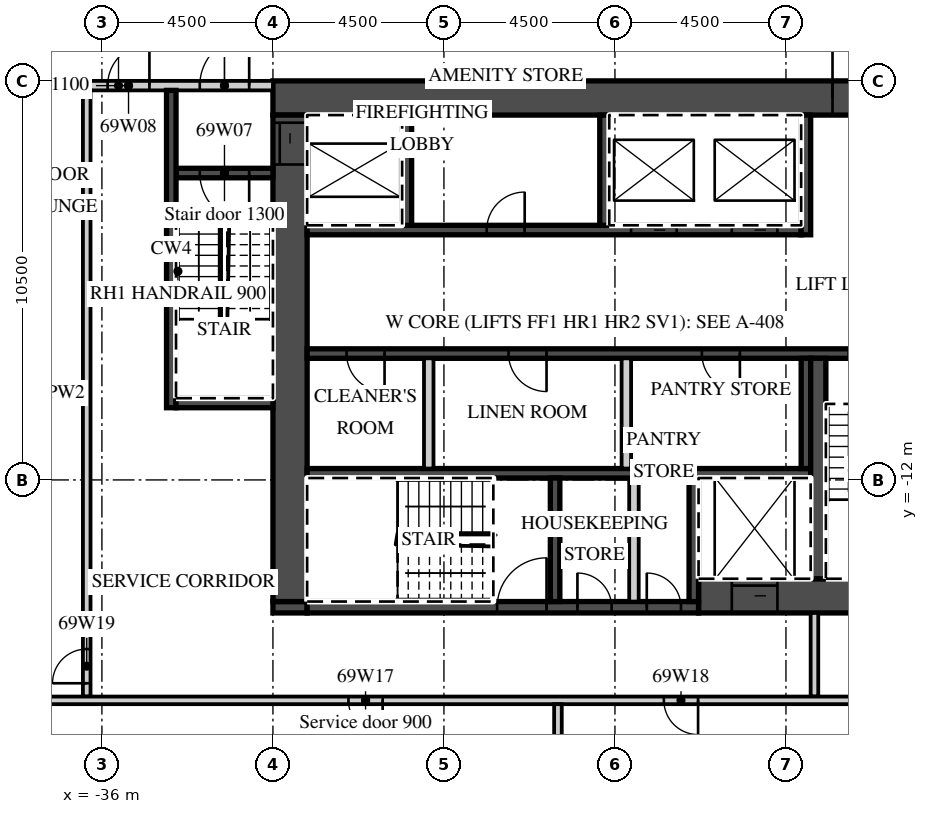
"""IFC4 building model, lengths in metres.
Left out: names, types, materials, properties, quantities, classifications, styles, units other than length and angle.
Written with IfcOpenShell. Run it as: python <this file> out.ifc"""

import sys

from ifc_helpers import new_model, si_unit, direction, frame, frame_2d, origin, place, context, subcontext, project, spatial, rectangle, extrude, element, fill, save


model = new_model("IFC4")
c1 = context("Model", 3, precision=1e-05, world=origin(), true_north=direction((0.0, 1.0)))
c2 = subcontext(c1, "Body", "Model", "MODEL_VIEW")
j1 = project(units=[si_unit("LENGTHUNIT", "METRE"), si_unit("PLANEANGLEUNIT", "RADIAN")], contexts=[c1])
p1 = place(None, origin())
s1 = spatial("IfcSite", under=j1, at=p1, CompositionType="ELEMENT")
p2 = place(p1, origin())
s2 = spatial("IfcBuilding", under=s1, at=p2, CompositionType="ELEMENT")
p3 = place(p2, frame((0.0, 0.0, 278.4)))
s3 = spatial("IfcBuildingStorey", under=s2, at=p3, CompositionType="ELEMENT", Elevation=278.4)
p4 = place(p3, frame((-31.5, -1.95, 0.0), z_axis=(0.0, 0.0, 1.0), x_axis=(1.0, 0.0, 0.0)))
e1 = element("IfcWall", 1, at=p4, inside=s3, PredefinedType="SHEAR", context=c2, shape_type="SweptSolid", body=[
    extrude(rectangle(XDim=18.0, YDim=0.9, at=frame_2d((9.0, 0.0))), origin(), (0.0, 0.0, 1.0), 3.02),
])
p5 = place(p4, frame((14.725, 0.0, 0.0)))
e2 = element("IfcOpeningElement", 2, at=p5, cuts=e1, PredefinedType="OPENING", context=c2, shape_type="SweptSolid", body=[
    extrude(rectangle(XDim=1.8, YDim=2.1, at=frame_2d((0.9, 1.05))), frame((0.0, 0.46, 0.0), z_axis=(0.0, -1.0, 0.0), x_axis=(1.0, 0.0, 0.0)), (0.0, 0.0, 1.0), 0.92),
])
p6 = place(p3, frame((-20.3, -15.05, 0.0), z_axis=(0.0, 0.0, 1.0), x_axis=(1.0, 0.0, 0.0)))
e3 = element("IfcWall", 3, at=p6, inside=s3, PredefinedType="SHEAR", context=c2, shape_type="SweptSolid", body=[
    extrude(rectangle(XDim=6.8, YDim=0.9, at=frame_2d((3.4, 0.0))), origin(), (0.0, 0.0, 1.0), 3.02),
])
p7 = place(p6, frame((0.875, 0.0, 0.0)))
e4 = element("IfcOpeningElement", 4, at=p7, cuts=e3, PredefinedType="OPENING", context=c2, shape_type="SweptSolid", body=[
    extrude(rectangle(XDim=1.2, YDim=2.1, at=frame_2d((0.6, 1.05))), frame((0.0, 0.46, 0.0), z_axis=(0.0, -1.0, 0.0), x_axis=(1.0, 0.0, 0.0)), (0.0, 0.0, 1.0), 0.92),
])
p8 = place(p3, frame((-31.5, -15.35, 0.0), z_axis=(0.0, 0.0, 1.0), x_axis=(1.0, 0.0, 0.0)))
e5 = element("IfcWall", 5, at=p8, inside=s3, PredefinedType="SHEAR", context=c2, shape_type="SweptSolid", body=[
    extrude(rectangle(XDim=0.9, YDim=0.3, at=frame_2d((0.45, 0.0))), origin(), (0.0, 0.0, 1.0), 3.02),
])
p9 = place(p3, frame((-30.6, -15.35, 0.0), z_axis=(0.0, 0.0, 1.0), x_axis=(1.0, 0.0, 0.0)))
e6 = element("IfcWall", 6, at=p9, inside=s3, PredefinedType="SHEAR", context=c2, shape_type="SweptSolid", body=[
    extrude(rectangle(XDim=10.3, YDim=0.3, at=frame_2d((5.15, 0.0))), origin(), (0.0, 0.0, 1.0), 3.02),
])
p10 = place(p9, frame((5.0, 0.0, 0.0)))
e7 = element("IfcOpeningElement", 7, at=p10, cuts=e6, PredefinedType="OPENING", context=c2, shape_type="SweptSolid", body=[
    extrude(rectangle(XDim=1.3, YDim=2.1, at=frame_2d((0.65, 1.05))), frame((0.0, 0.16, 0.0), z_axis=(0.0, -1.0, 0.0), x_axis=(1.0, 0.0, 0.0)), (0.0, 0.0, 1.0), 0.32),
])
p11 = place(p9, frame((7.113, 0.0, 0.0)))
e8 = element("IfcOpeningElement", 8, at=p11, cuts=e6, PredefinedType="OPENING", context=c2, shape_type="SweptSolid", body=[
    extrude(rectangle(XDim=0.9, YDim=2.1, at=frame_2d((0.45, 1.05))), frame((0.0, 0.16, 0.0), z_axis=(0.0, -1.0, 0.0), x_axis=(1.0, 0.0, 0.0)), (0.0, 0.0, 1.0), 0.32),
])
p12 = place(p9, frame((8.938, 0.0, 0.0)))
e9 = element("IfcOpeningElement", 9, at=p12, cuts=e6, PredefinedType="OPENING", context=c2, shape_type="SweptSolid", body=[
    extrude(rectangle(XDim=0.9, YDim=2.1, at=frame_2d((0.45, 1.05))), frame((0.0, 0.16, 0.0), z_axis=(0.0, -1.0, 0.0), x_axis=(1.0, 0.0, 0.0)), (0.0, 0.0, 1.0), 0.32),
])
p13 = place(p3, frame((-31.05, -15.2, 0.0), z_axis=(0.0, 0.0, 1.0), x_axis=(0.0, 1.0, 0.0)))
e10 = element("IfcWall", 10, at=p13, inside=s3, PredefinedType="SHEAR", context=c2, shape_type="SweptSolid", body=[
    extrude(rectangle(XDim=12.8, YDim=0.9, at=frame_2d((6.4, 0.0))), origin(), (0.0, 0.0, 1.0), 3.02),
])
p14 = place(p13, frame((11.5, 0.0, 0.0)))
e11 = element("IfcOpeningElement", 11, at=p14, cuts=e10, PredefinedType="OPENING", context=c2, shape_type="SweptSolid", body=[
    extrude(rectangle(XDim=1.1, YDim=2.1, at=frame_2d((0.55, 1.05))), frame((0.0, 0.46, 0.0), z_axis=(0.0, -1.0, 0.0), x_axis=(1.0, 0.0, 0.0)), (0.0, 0.0, 1.0), 0.92),
])
p15 = place(p3, frame((-30.6, -5.425, 0.0), z_axis=(0.0, 0.0, 1.0), x_axis=(1.0, 0.0, 0.0)))
e12 = element("IfcWall", 12, at=p15, inside=s3, PredefinedType="SHEAR", context=c2, shape_type="SweptSolid", body=[
    extrude(rectangle(XDim=13.0, YDim=0.25, at=frame_2d((6.5, 0.0))), origin(), (0.0, 0.0, 1.0), 3.02),
])
p16 = place(p15, frame((8.525, 0.0, 0.0)))
e13 = element("IfcOpeningElement", 13, at=p16, cuts=e12, PredefinedType="OPENING", context=c2, shape_type="SweptSolid", body=[
    extrude(rectangle(XDim=1.2, YDim=2.1, at=frame_2d((0.6, 1.05))), frame((0.0, 0.135, 0.0), z_axis=(0.0, -1.0, 0.0), x_axis=(1.0, 0.0, 0.0)), (0.0, 0.0, 1.0), 0.27),
])
p17 = place(p15, frame((11.175, 0.0, 0.0)))
e14 = element("IfcOpeningElement", 14, at=p17, cuts=e12, PredefinedType="OPENING", context=c2, shape_type="SweptSolid", body=[
    extrude(rectangle(XDim=1.2, YDim=2.1, at=frame_2d((0.6, 1.05))), frame((0.0, 0.135, 0.0), z_axis=(0.0, -1.0, 0.0), x_axis=(1.0, 0.0, 0.0)), (0.0, 0.0, 1.0), 0.27),
])
p18 = place(p15, frame((4.725, 0.0, 0.0)))
e15 = element("IfcOpeningElement", 15, at=p18, cuts=e12, PredefinedType="OPENING", context=c2, shape_type="SweptSolid", body=[
    extrude(rectangle(XDim=1.0, YDim=2.1, at=frame_2d((0.5, 1.05))), frame((0.0, 0.135, 0.0), z_axis=(0.0, -1.0, 0.0), x_axis=(1.0, 0.0, 0.0)), (0.0, 0.0, 1.0), 0.27),
])
p19 = place(p3, frame((-17.475, -5.55, 0.0), z_axis=(0.0, 0.0, 1.0), x_axis=(0.0, 1.0, 0.0)))
e16 = element("IfcWall", 16, at=p19, inside=s3, PredefinedType="SHEAR", context=c2, shape_type="SweptSolid", body=[
    extrude(rectangle(XDim=3.15, YDim=0.25, at=frame_2d((1.575, 0.0))), origin(), (0.0, 0.0, 1.0), 3.02),
])
for number, where, z_axis, x_axis in (
    (17, (-27.975, -5.3, 0.0), (0.0, 0.0, 1.0), (0.0, 1.0, 0.0)),
    (18, (-22.775, -5.3, 0.0), (0.0, 0.0, 1.0), (0.0, 1.0, 0.0)),
):
    element("IfcWall", number, at=place(p3, frame(where, z_axis=z_axis, x_axis=x_axis)), inside=s3, PredefinedType="SHEAR", context=c2, shape_type="SweptSolid", body=[
        extrude(rectangle(XDim=2.9, YDim=0.25, at=frame_2d((1.45, 0.0))), origin(), (0.0, 0.0, 1.0), 3.02),
    ])
p20 = place(p3, frame((-30.6, -8.675, 0.0), z_axis=(0.0, 0.0, 1.0), x_axis=(1.0, 0.0, 0.0)))
e19 = element("IfcWall", 19, at=p20, inside=s3, PredefinedType="SHEAR", context=c2, shape_type="SweptSolid", body=[
    extrude(rectangle(XDim=16.2, YDim=0.25, at=frame_2d((8.1, 0.0))), origin(), (0.0, 0.0, 1.0), 3.02),
])
p21 = place(p20, frame((14.25, 0.0, 0.0)))
e20 = element("IfcOpeningElement", 20, at=p21, cuts=e19, PredefinedType="OPENING", context=c2, shape_type="SweptSolid", body=[
    extrude(rectangle(XDim=1.3, YDim=2.1, at=frame_2d((0.65, 1.05))), frame((0.0, 0.135, 0.0), z_axis=(0.0, -1.0, 0.0), x_axis=(1.0, 0.0, 0.0)), (0.0, 0.0, 1.0), 0.27),
])
p22 = place(p20, frame((1.038, 0.0, 0.0)))
e21 = element("IfcOpeningElement", 21, at=p22, cuts=e19, PredefinedType="OPENING", context=c2, shape_type="SweptSolid", body=[
    extrude(rectangle(XDim=1.0, YDim=2.1, at=frame_2d((0.5, 1.05))), frame((0.0, 0.135, 0.0), z_axis=(0.0, -1.0, 0.0), x_axis=(1.0, 0.0, 0.0)), (0.0, 0.0, 1.0), 0.27),
])
p23 = place(p20, frame((5.3, 0.0, 0.0)))
e22 = element("IfcOpeningElement", 22, at=p23, cuts=e19, PredefinedType="OPENING", context=c2, shape_type="SweptSolid", body=[
    extrude(rectangle(XDim=1.0, YDim=2.1, at=frame_2d((0.5, 1.05))), frame((0.0, 0.135, 0.0), z_axis=(0.0, -1.0, 0.0), x_axis=(1.0, 0.0, 0.0)), (0.0, 0.0, 1.0), 0.27),
])
p24 = place(p20, frame((10.387, 0.0, 0.0)))
e23 = element("IfcOpeningElement", 23, at=p24, cuts=e19, PredefinedType="OPENING", context=c2, shape_type="SweptSolid", body=[
    extrude(rectangle(XDim=1.0, YDim=2.1, at=frame_2d((0.5, 1.05))), frame((0.0, 0.135, 0.0), z_axis=(0.0, -1.0, 0.0), x_axis=(1.0, 0.0, 0.0)), (0.0, 0.0, 1.0), 0.27),
])
p25 = place(p3, frame((-30.6, -11.825, 0.0), z_axis=(0.0, 0.0, 1.0), x_axis=(1.0, 0.0, 0.0)))
e24 = element("IfcWall", 24, at=p25, inside=s3, PredefinedType="SHEAR", context=c2, shape_type="SweptSolid", body=[
    extrude(rectangle(XDim=13.25, YDim=0.25, at=frame_2d((6.625, 0.0))), origin(), (0.0, 0.0, 1.0), 3.02),
])
p26 = place(p3, frame((-17.475, -11.7, 0.0), z_axis=(0.0, 0.0, 1.0), x_axis=(0.0, 1.0, 0.0)))
e25 = element("IfcWall", 25, at=p26, inside=s3, PredefinedType="SHEAR", context=c2, shape_type="SweptSolid", body=[
    extrude(rectangle(XDim=2.9, YDim=0.25, at=frame_2d((1.45, 0.0))), origin(), (0.0, 0.0, 1.0), 3.02),
])
for number, where, z_axis, x_axis in (
    (26, (-27.4, -11.7, 0.0), (0.0, 0.0, 1.0), (0.0, 1.0, 0.0)),
    (27, (-22.2, -11.7, 0.0), (0.0, 0.0, 1.0), (0.0, 1.0, 0.0)),
):
    element("IfcWall", number, at=place(p3, frame(where, z_axis=z_axis, x_axis=x_axis)), inside=s3, PredefinedType="PARTITIONING", context=c2, shape_type="SweptSolid", body=[
        extrude(rectangle(XDim=2.9, YDim=0.25, at=frame_2d((1.45, 0.0))), origin(), (0.0, 0.0, 1.0), 3.02),
    ])
p27 = place(p3, frame((-17.15, -14.6, 0.0), z_axis=(0.0, 0.0, 1.0), x_axis=(0.0, 1.0, 0.0)))
e28 = element("IfcWall", 28, at=p27, inside=s3, PredefinedType="SHEAR", context=c2, shape_type="SweptSolid", body=[
    extrude(rectangle(XDim=5.8, YDim=0.4, at=frame_2d((2.9, 0.0))), origin(), (0.0, 0.0, 1.0), 3.02),
])
for number, where, z_axis, x_axis in (
    (29, (-20.425, -15.2, 0.0), (0.0, 0.0, 1.0), (0.0, 1.0, 0.0)),
    (30, (-24.075, -15.2, 0.0), (0.0, 0.0, 1.0), (0.0, 1.0, 0.0)),
):
    element("IfcWall", number, at=place(p3, frame(where, z_axis=z_axis, x_axis=x_axis)), inside=s3, PredefinedType="SHEAR", context=c2, shape_type="SweptSolid", body=[
        extrude(rectangle(XDim=3.25, YDim=0.25, at=frame_2d((1.625, 0.0))), origin(), (0.0, 0.0, 1.0), 3.02),
    ])
p28 = place(p3, frame((-22.0, -15.2, 0.0), z_axis=(0.0, 0.0, 1.0), x_axis=(0.0, 1.0, 0.0)))
e31 = element("IfcWall", 31, at=p28, inside=s3, PredefinedType="PARTITIONING", context=c2, shape_type="SweptSolid", body=[
    extrude(rectangle(XDim=3.25, YDim=0.25, at=frame_2d((1.625, 0.0))), origin(), (0.0, 0.0, 1.0), 3.02),
])
p29 = place(p3, frame((-39.627, -1.625, 0.0), z_axis=(0.0, 0.0, 1.0), x_axis=(1.0, 0.0, 0.0)))
e32 = element("IfcWall", 32, at=p29, inside=s3, PredefinedType="PARTITIONING", context=c2, shape_type="SweptSolid", body=[
    extrude(rectangle(XDim=8.127, YDim=0.25, at=frame_2d((4.063, 0.0))), origin(), (0.0, 0.0, 1.0), 3.02),
])
p30 = place(p29, frame((6.202, 0.0, 0.0)))
e33 = element("IfcOpeningElement", 33, at=p30, cuts=e32, PredefinedType="OPENING", context=c2, shape_type="SweptSolid", body=[
    extrude(rectangle(XDim=1.3, YDim=2.1, at=frame_2d((0.65, 1.05))), frame((0.0, 0.135, 0.0), z_axis=(0.0, -1.0, 0.0), x_axis=(1.0, 0.0, 0.0)), (0.0, 0.0, 1.0), 0.27),
])
p31 = place(p29, frame((3.777, 0.0, 0.0)))
e34 = element("IfcOpeningElement", 34, at=p31, cuts=e32, PredefinedType="OPENING", context=c2, shape_type="SweptSolid", body=[
    extrude(rectangle(XDim=1.1, YDim=2.1, at=frame_2d((0.55, 1.05))), frame((0.0, 0.135, 0.0), z_axis=(0.0, -1.0, 0.0), x_axis=(1.0, 0.0, 0.0)), (0.0, 0.0, 1.0), 0.27),
])
p32 = place(p3, frame((-34.05, -3.925, 0.0), z_axis=(0.0, 0.0, 1.0), x_axis=(1.0, 0.0, 0.0)))
e35 = element("IfcWall", 35, at=p32, inside=s3, PredefinedType="SHEAR", context=c2, shape_type="SweptSolid", body=[
    extrude(rectangle(XDim=2.55, YDim=0.25, at=frame_2d((1.275, 0.0))), origin(), (0.0, 0.0, 1.0), 3.02),
])
p33 = place(p32, frame((0.625, 0.0, 0.0)))
e36 = element("IfcOpeningElement", 36, at=p33, cuts=e35, PredefinedType="OPENING", context=c2, shape_type="SweptSolid", body=[
    extrude(rectangle(XDim=1.3, YDim=2.1, at=frame_2d((0.65, 1.05))), frame((0.0, 0.135, 0.0), z_axis=(0.0, -1.0, 0.0), x_axis=(1.0, 0.0, 0.0)), (0.0, 0.0, 1.0), 0.27),
])
p34 = place(p3, frame((-34.175, -10.1, 0.0), z_axis=(0.0, 0.0, 1.0), x_axis=(0.0, 1.0, 0.0)))
e37 = element("IfcWall", 37, at=p34, inside=s3, PredefinedType="SHEAR", context=c2, shape_type="SweptSolid", body=[
    extrude(rectangle(XDim=8.35, YDim=0.25, at=frame_2d((4.175, 0.0))), origin(), (0.0, 0.0, 1.0), 3.02),
])
p35 = place(p3, frame((-34.05, -9.975, 0.0), z_axis=(0.0, 0.0, 1.0), x_axis=(1.0, 0.0, 0.0)))
e38 = element("IfcWall", 38, at=p35, inside=s3, PredefinedType="SHEAR", context=c2, shape_type="SweptSolid", body=[
    extrude(rectangle(XDim=2.55, YDim=0.25, at=frame_2d((1.275, 0.0))), origin(), (0.0, 0.0, 1.0), 3.02),
])
p36 = place(p3, frame((-17.25, -17.7, 0.0), z_axis=(0.0, 0.0, 1.0), x_axis=(0.0, 1.0, 0.0)))
e39 = element("IfcWall", 39, at=p36, inside=s3, PredefinedType="PARTITIONING", context=c2, shape_type="SweptSolid", body=[
    extrude(rectangle(XDim=2.2, YDim=0.2, at=frame_2d((1.1, 0.0))), origin(), (0.0, 0.0, 1.0), 3.02),
])
p37 = place(p3, frame((-36.4, -17.7, 0.0), z_axis=(0.0, 0.0, 1.0), x_axis=(0.0, 1.0, 0.0)))
e40 = element("IfcWall", 40, at=p37, inside=s3, PredefinedType="PARTITIONING", context=c2, shape_type="SweptSolid", body=[
    extrude(rectangle(XDim=15.95, YDim=0.2, at=frame_2d((7.975, 0.0))), origin(), (0.0, 0.0, 1.0), 3.02),
])
p38 = place(p37, frame((0.35, 0.0, 0.0)))
e41 = element("IfcOpeningElement", 41, at=p38, cuts=e40, PredefinedType="OPENING", context=c2, shape_type="SweptSolid", body=[
    extrude(rectangle(XDim=0.9, YDim=2.1, at=frame_2d((0.45, 1.05))), frame((0.0, 0.11, 0.0), z_axis=(0.0, -1.0, 0.0), x_axis=(1.0, 0.0, 0.0)), (0.0, 0.0, 1.0), 0.22),
])
p39 = place(p3, frame((-38.07, -17.8, 0.0), z_axis=(0.0, 0.0, 1.0), x_axis=(1.0, 0.0, 0.0)))
e42 = element("IfcWall", 42, at=p39, inside=s3, PredefinedType="PARTITIONING", context=c2, shape_type="SweptSolid", body=[
    extrude(rectangle(XDim=24.47, YDim=0.2, at=frame_2d((12.235, 0.0))), origin(), (0.0, 0.0, 1.0), 3.02),
])
p40 = place(p39, frame((8.557, 0.0, 0.0)))
e43 = element("IfcOpeningElement", 43, at=p40, cuts=e42, PredefinedType="OPENING", context=c2, shape_type="SweptSolid", body=[
    extrude(rectangle(XDim=0.9, YDim=2.1, at=frame_2d((0.45, 1.05))), frame((0.0, 0.11, 0.0), z_axis=(0.0, -1.0, 0.0), x_axis=(1.0, 0.0, 0.0)), (0.0, 0.0, 1.0), 0.22),
])
p41 = place(p39, frame((16.857, 0.0, 0.0)))
e44 = element("IfcOpeningElement", 44, at=p41, cuts=e42, PredefinedType="OPENING", context=c2, shape_type="SweptSolid", body=[
    extrude(rectangle(XDim=0.9, YDim=2.1, at=frame_2d((0.45, 1.05))), frame((0.0, 0.11, 0.0), z_axis=(0.0, -1.0, 0.0), x_axis=(1.0, 0.0, 0.0)), (0.0, 0.0, 1.0), 0.22),
])
p42 = place(p3, frame((-24.0, -22.408, 0.0), z_axis=(0.0, 0.0, 1.0), x_axis=(0.0, 1.0, 0.0)))
e45 = element("IfcWall", 45, at=p42, inside=s3, PredefinedType="PARTITIONING", context=c2, shape_type="SweptSolid", body=[
    extrude(rectangle(XDim=4.508, YDim=0.2, at=frame_2d((2.254, 0.0))), origin(), (0.0, 0.0, 1.0), 3.02),
])
p43 = place(p16, origin())
e46 = element("IfcDoor", 46, at=p43, inside=s3, OperationType="SLIDING_TO_LEFT", PredefinedType="DOOR", context=c2, shape_type="SweptSolid", body=[
    extrude(rectangle(XDim=1.2, YDim=2.1, at=frame_2d((0.6, 1.05))), frame((0.0, 0.025, 0.0), z_axis=(0.0, -1.0, 0.0), x_axis=(1.0, 0.0, 0.0)), (0.0, 0.0, 1.0), 0.05),
])
fill(e13, e46)
p44 = place(p17, origin())
e47 = element("IfcDoor", 47, at=p44, inside=s3, OperationType="SLIDING_TO_RIGHT", PredefinedType="DOOR", context=c2, shape_type="SweptSolid", body=[
    extrude(rectangle(XDim=1.2, YDim=2.1, at=frame_2d((0.6, 1.05))), frame((0.0, 0.025, 0.0), z_axis=(0.0, -1.0, 0.0), x_axis=(1.0, 0.0, 0.0)), (0.0, 0.0, 1.0), 0.05),
])
fill(e14, e47)
p45 = place(p7, origin())
e48 = element("IfcDoor", 48, at=p45, inside=s3, OperationType="SLIDING_TO_LEFT", PredefinedType="DOOR", context=c2, shape_type="SweptSolid", body=[
    extrude(rectangle(XDim=1.2, YDim=2.1, at=frame_2d((0.6, 1.05))), frame((0.0, 0.025, 0.0), z_axis=(0.0, -1.0, 0.0), x_axis=(1.0, 0.0, 0.0)), (0.0, 0.0, 1.0), 0.05),
])
fill(e4, e48)
p46 = place(p14, origin())
e49 = element("IfcDoor", 49, at=p46, inside=s3, OperationType="SLIDING_TO_RIGHT", PredefinedType="DOOR", context=c2, shape_type="SweptSolid", body=[
    extrude(rectangle(XDim=1.1, YDim=2.1, at=frame_2d((0.55, 1.05))), frame((0.0, 0.025, 0.0), z_axis=(0.0, -1.0, 0.0), x_axis=(1.0, 0.0, 0.0)), (0.0, 0.0, 1.0), 0.05),
])
fill(e11, e49)
p47 = place(p5, origin())
e50 = element("IfcDoor", 50, at=p47, inside=s3, OperationType="DOUBLE_DOOR_DOUBLE_SWING", PredefinedType="DOOR", context=c2, shape_type="SweptSolid", body=[
    extrude(rectangle(XDim=1.8, YDim=2.1, at=frame_2d((0.9, 1.05))), frame((0.0, 0.025, 0.0), z_axis=(0.0, -1.0, 0.0), x_axis=(1.0, 0.0, 0.0)), (0.0, 0.0, 1.0), 0.05),
])
fill(e2, e50)
p48 = place(p30, origin())
e51 = element("IfcDoor", 51, at=p48, inside=s3, OperationType="SINGLE_SWING_RIGHT", PredefinedType="DOOR", context=c2, shape_type="SweptSolid", body=[
    extrude(rectangle(XDim=1.3, YDim=2.1, at=frame_2d((0.65, 1.05))), frame((0.0, 0.025, 0.0), z_axis=(0.0, -1.0, 0.0), x_axis=(1.0, 0.0, 0.0)), (0.0, 0.0, 1.0), 0.05),
])
fill(e33, e51)
p49 = place(p33, origin())
e52 = element("IfcDoor", 52, at=p49, inside=s3, OperationType="SINGLE_SWING_RIGHT", PredefinedType="DOOR", context=c2, shape_type="SweptSolid", body=[
    extrude(rectangle(XDim=1.3, YDim=2.1, at=frame_2d((0.65, 1.05))), frame((0.0, 0.025, 0.0), z_axis=(0.0, -1.0, 0.0), x_axis=(1.0, 0.0, 0.0)), (0.0, 0.0, 1.0), 0.05),
])
fill(e36, e52)
p50 = place(p31, origin())
e53 = element("IfcDoor", 53, at=p50, inside=s3, OperationType="SINGLE_SWING_RIGHT", PredefinedType="DOOR", context=c2, shape_type="SweptSolid", body=[
    extrude(rectangle(XDim=1.1, YDim=2.1, at=frame_2d((0.55, 1.05))), frame((0.0, 0.025, 0.0), z_axis=(0.0, -1.0, 0.0), x_axis=(1.0, 0.0, 0.0)), (0.0, 0.0, 1.0), 0.05),
])
fill(e34, e53)
p51 = place(p21, origin())
e54 = element("IfcDoor", 54, at=p51, inside=s3, OperationType="SINGLE_SWING_RIGHT", PredefinedType="DOOR", context=c2, shape_type="SweptSolid", body=[
    extrude(rectangle(XDim=1.3, YDim=2.1, at=frame_2d((0.65, 1.05))), frame((0.0, 0.025, 0.0), z_axis=(0.0, -1.0, 0.0), x_axis=(1.0, 0.0, 0.0)), (0.0, 0.0, 1.0), 0.05),
])
fill(e20, e54)
p52 = place(p10, origin())
e55 = element("IfcDoor", 55, at=p52, inside=s3, OperationType="SINGLE_SWING_RIGHT", PredefinedType="DOOR", context=c2, shape_type="SweptSolid", body=[
    extrude(rectangle(XDim=1.3, YDim=2.1, at=frame_2d((0.65, 1.05))), frame((0.0, 0.025, 0.0), z_axis=(0.0, -1.0, 0.0), x_axis=(1.0, 0.0, 0.0)), (0.0, 0.0, 1.0), 0.05),
])
fill(e7, e55)
p53 = place(p11, origin())
e56 = element("IfcDoor", 56, at=p53, inside=s3, OperationType="SINGLE_SWING_LEFT", PredefinedType="DOOR", context=c2, shape_type="SweptSolid", body=[
    extrude(rectangle(XDim=0.9, YDim=2.1, at=frame_2d((0.45, 1.05))), frame((0.0, 0.025, 0.0), z_axis=(0.0, -1.0, 0.0), x_axis=(1.0, 0.0, 0.0)), (0.0, 0.0, 1.0), 0.05),
])
fill(e8, e56)
p54 = place(p12, origin())
e57 = element("IfcDoor", 57, at=p54, inside=s3, OperationType="SINGLE_SWING_LEFT", PredefinedType="DOOR", context=c2, shape_type="SweptSolid", body=[
    extrude(rectangle(XDim=0.9, YDim=2.1, at=frame_2d((0.45, 1.05))), frame((0.0, 0.025, 0.0), z_axis=(0.0, -1.0, 0.0), x_axis=(1.0, 0.0, 0.0)), (0.0, 0.0, 1.0), 0.05),
])
fill(e9, e57)
p55 = place(p22, origin())
e58 = element("IfcDoor", 58, at=p55, inside=s3, OperationType="SINGLE_SWING_RIGHT", PredefinedType="DOOR", context=c2, shape_type="SweptSolid", body=[
    extrude(rectangle(XDim=1.0, YDim=2.1, at=frame_2d((0.5, 1.05))), frame((0.0, 0.025, 0.0), z_axis=(0.0, -1.0, 0.0), x_axis=(1.0, 0.0, 0.0)), (0.0, 0.0, 1.0), 0.05),
])
fill(e21, e58)
p56 = place(p23, origin())
e59 = element("IfcDoor", 59, at=p56, inside=s3, OperationType="SINGLE_SWING_RIGHT", PredefinedType="DOOR", context=c2, shape_type="SweptSolid", body=[
    extrude(rectangle(XDim=1.0, YDim=2.1, at=frame_2d((0.5, 1.05))), frame((0.0, 0.025, 0.0), z_axis=(0.0, -1.0, 0.0), x_axis=(1.0, 0.0, 0.0)), (0.0, 0.0, 1.0), 0.05),
])
fill(e22, e59)
p57 = place(p24, origin())
e60 = element("IfcDoor", 60, at=p57, inside=s3, OperationType="SINGLE_SWING_RIGHT", PredefinedType="DOOR", context=c2, shape_type="SweptSolid", body=[
    extrude(rectangle(XDim=1.0, YDim=2.1, at=frame_2d((0.5, 1.05))), frame((0.0, 0.025, 0.0), z_axis=(0.0, -1.0, 0.0), x_axis=(1.0, 0.0, 0.0)), (0.0, 0.0, 1.0), 0.05),
])
fill(e23, e60)
p58 = place(p18, origin())
e61 = element("IfcDoor", 61, at=p58, inside=s3, OperationType="SINGLE_SWING_RIGHT", PredefinedType="DOOR", context=c2, shape_type="SweptSolid", body=[
    extrude(rectangle(XDim=1.0, YDim=2.1, at=frame_2d((0.5, 1.05))), frame((0.0, 0.025, 0.0), z_axis=(0.0, -1.0, 0.0), x_axis=(1.0, 0.0, 0.0)), (0.0, 0.0, 1.0), 0.05),
])
fill(e15, e61)
p59 = place(p40, origin())
e62 = element("IfcDoor", 62, at=p59, inside=s3, OperationType="SINGLE_SWING_RIGHT", PredefinedType="DOOR", context=c2, shape_type="SweptSolid", body=[
    extrude(rectangle(XDim=0.9, YDim=2.1, at=frame_2d((0.45, 1.05))), frame((0.0, 0.025, 0.0), z_axis=(0.0, -1.0, 0.0), x_axis=(1.0, 0.0, 0.0)), (0.0, 0.0, 1.0), 0.05),
])
fill(e43, e62)
p60 = place(p41, origin())
e63 = element("IfcDoor", 63, at=p60, inside=s3, OperationType="SINGLE_SWING_RIGHT", PredefinedType="DOOR", context=c2, shape_type="SweptSolid", body=[
    extrude(rectangle(XDim=0.9, YDim=2.1, at=frame_2d((0.45, 1.05))), frame((0.0, 0.025, 0.0), z_axis=(0.0, -1.0, 0.0), x_axis=(1.0, 0.0, 0.0)), (0.0, 0.0, 1.0), 0.05),
])
fill(e44, e63)
p61 = place(p38, origin())
e64 = element("IfcDoor", 64, at=p61, inside=s3, OperationType="SINGLE_SWING_LEFT", PredefinedType="DOOR", context=c2, shape_type="SweptSolid", body=[
    extrude(rectangle(XDim=0.9, YDim=2.1, at=frame_2d((0.45, 1.05))), frame((0.0, 0.025, 0.0), z_axis=(0.0, -1.0, 0.0), x_axis=(1.0, 0.0, 0.0)), (0.0, 0.0, 1.0), 0.05),
])
fill(e41, e64)
save(model, sys.argv[1])
